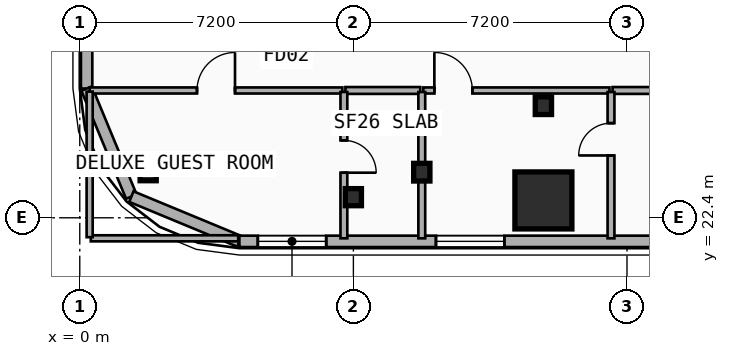
"""IFC4 building model, lengths in metres.
Left out: names, types, materials, properties, quantities, classifications, styles, units other than length and angle.
Written with IfcOpenShell. Run it as: python <this file> out.ifc"""

import sys

from ifc_helpers import new_model, si_unit, direction, frame, frame_2d, origin, origin_2d, place, context, subcontext, project, spatial, rectangle, i_section, extrude, element, fill, save


model = new_model("IFC4")
c1 = context("Model", 3, precision=1e-05, world=origin(), true_north=direction((0.0, 1.0)))
c2 = subcontext(c1, "Body", "Model", "MODEL_VIEW")
j1 = project(units=[si_unit("LENGTHUNIT", "METRE"), si_unit("PLANEANGLEUNIT", "RADIAN")], contexts=[c1])
p1 = place(None, origin())
s1 = spatial("IfcSite", under=j1, at=p1, CompositionType="ELEMENT")
p2 = place(p1, origin())
s2 = spatial("IfcBuilding", under=s1, at=p2, CompositionType="ELEMENT")
p3 = place(p2, frame((0.0, 0.0, 36.0)))
s3 = spatial("IfcBuildingStorey", under=s2, at=p3, CompositionType="ELEMENT", Elevation=36.0)
p4 = place(p3, frame((12.2, 25.35, 0.0), z_axis=(0.0, 0.0, 1.0), x_axis=(1.0, 0.0, 0.0)))
e1 = element("IfcColumn", 1, at=p4, inside=s3, PredefinedType="COLUMN", context=c2, shape_type="SweptSolid", body=[
    extrude(i_section(OverallWidth=0.428, OverallDepth=0.465, WebThickness=0.045, FlangeThickness=0.073, FilletRadius=0.015, at=origin_2d()), origin(), (0.0, 0.0, 1.0), 3.5),
])
p5 = place(p3, frame((12.2, 22.966, 0.0), z_axis=(0.0, -0.090310252801, 0.995913680114), x_axis=(1.0, 0.0, 0.0)))
e2 = element("IfcColumn", 2, at=p5, inside=s3, PredefinedType="COLUMN", context=c2, shape_type="SweptSolid", body=[
    extrude(rectangle(XDim=1.5, YDim=1.5, at=origin_2d()), origin(), (0.0, 0.0, 1.0), 3.514),
])
p6 = place(p3, frame((9.0, 23.6, 0.0), z_axis=(0.0, 0.0, 1.0), x_axis=(1.0, 0.0, 0.0)))
e3 = element("IfcColumn", 3, at=p6, inside=s3, PredefinedType="COLUMN", context=c2, shape_type="SweptSolid", body=[
    extrude(i_section(OverallWidth=0.428, OverallDepth=0.465, WebThickness=0.045, FlangeThickness=0.073, FilletRadius=0.015, at=origin_2d()), origin(), (0.0, 0.0, 1.0), 3.5),
])
p7 = place(p3, frame((1.8, 23.6, 0.0), z_axis=(0.0, 0.0, 1.0), x_axis=(1.0, 0.0, 0.0)))
e4 = element("IfcColumn", 4, at=p7, inside=s3, PredefinedType="COLUMN", context=c2, shape_type="SweptSolid", body=[
    extrude(i_section(OverallWidth=0.424, OverallDepth=0.45, WebThickness=0.041, FlangeThickness=0.065, FilletRadius=0.015, at=origin_2d()), origin(), (0.0, 0.0, 1.0), 3.5),
])
p8 = place(p3, frame((7.2, 23.039, 0.0), z_axis=(0.0, -0.079960777917, 0.996798010629), x_axis=(1.0, 0.0, 0.0)))
e5 = element("IfcColumn", 5, at=p8, inside=s3, PredefinedType="COLUMN", context=c2, shape_type="SweptSolid", body=[
    extrude(i_section(OverallWidth=0.424, OverallDepth=0.45, WebThickness=0.041, FlangeThickness=0.065, FilletRadius=0.015, at=origin_2d()), origin(), (0.0, 0.0, 1.0), 3.511),
])
p9 = place(p3, frame((0.18, 25.8, 0.0), z_axis=(0.0, 0.0, 1.0), x_axis=(0.0, 1.0, 0.0)))
e6 = element("IfcWall", 6, at=p9, inside=s3, PredefinedType="SOLIDWALL", context=c2, shape_type="SweptSolid", body=[
    extrude(rectangle(XDim=15.2, YDim=0.3, at=frame_2d((7.6, 0.0))), origin(), (0.0, 0.0, 1.0), 3.24),
])
p10 = place(p9, frame((2.67, 0.0, 0.48)))
e7 = element("IfcOpeningElement", 7, at=p10, cuts=e6, PredefinedType="OPENING", context=c2, shape_type="SweptSolid", body=[
    extrude(rectangle(XDim=1.4, YDim=1.8, at=frame_2d((0.7, 0.9))), frame((0.0, 0.16, 0.0), z_axis=(0.0, -1.0, 0.0), x_axis=(1.0, 0.0, 0.0)), (0.0, 0.0, 1.0), 0.32),
])
p11 = place(p9, frame((7.709, 0.0, 0.48)))
e8 = element("IfcOpeningElement", 8, at=p11, cuts=e6, PredefinedType="OPENING", context=c2, shape_type="SweptSolid", body=[
    extrude(rectangle(XDim=1.4, YDim=1.8, at=frame_2d((0.7, 0.9))), frame((0.0, 0.16, 0.0), z_axis=(0.0, -1.0, 0.0), x_axis=(1.0, 0.0, 0.0)), (0.0, 0.0, 1.0), 0.32),
])
for number, where, z_axis, x_axis in (
    (9, (1.357, 22.958, 0.0), (0.0, 0.0, 1.0), (-0.383, 0.924, 0.0)),
    (10, (4.2, 21.78, 0.0), (0.0, 0.0, 1.0), (-0.924, 0.383, 0.0)),
):
    element("IfcWall", number, at=place(p3, frame(where, z_axis=z_axis, x_axis=x_axis)), inside=s3, PredefinedType="SOLIDWALL", context=c2, shape_type="SweptSolid", body=[
        extrude(rectangle(XDim=3.077, YDim=0.3, at=frame_2d((1.538, 0.0))), origin(), (0.0, 0.0, 1.0), 3.24),
    ])
p12 = place(p3, frame((53.4, 21.78, 0.0), z_axis=(0.0, 0.0, 1.0), x_axis=(-1.0, 0.0, 0.0)))
e11 = element("IfcWall", 11, at=p12, inside=s3, PredefinedType="SOLIDWALL", context=c2, shape_type="SweptSolid", body=[
    extrude(rectangle(XDim=49.2, YDim=0.3, at=frame_2d((24.6, 0.0))), origin(), (0.0, 0.0, 1.0), 3.24),
])
p13 = place(p12, frame((46.915, 0.0, 0.65)))
e12 = element("IfcOpeningElement", 12, at=p13, cuts=e11, PredefinedType="OPENING", context=c2, shape_type="SweptSolid", body=[
    extrude(rectangle(XDim=1.8, YDim=1.8, at=frame_2d((0.9, 0.9))), frame((0.0, 0.16, 0.0), z_axis=(0.0, -1.0, 0.0), x_axis=(1.0, 0.0, 0.0)), (0.0, 0.0, 1.0), 0.32),
])
p14 = place(p12, frame((42.227, 0.0, 0.65)))
e13 = element("IfcOpeningElement", 13, at=p14, cuts=e11, PredefinedType="OPENING", context=c2, shape_type="SweptSolid", body=[
    extrude(rectangle(XDim=1.8, YDim=1.8, at=frame_2d((0.9, 0.9))), frame((0.0, 0.16, 0.0), z_axis=(0.0, -1.0, 0.0), x_axis=(1.0, 0.0, 0.0)), (0.0, 0.0, 1.0), 0.32),
])
p15 = place(p12, frame((33.055, 0.0, 0.48)))
e14 = element("IfcOpeningElement", 14, at=p15, cuts=e11, PredefinedType="OPENING", context=c2, shape_type="SweptSolid", body=[
    extrude(rectangle(XDim=1.2, YDim=1.5, at=frame_2d((0.6, 0.75))), frame((0.0, 0.16, 0.0), z_axis=(0.0, -1.0, 0.0), x_axis=(1.0, 0.0, 0.0)), (0.0, 0.0, 1.0), 0.32),
])
p16 = place(p12, frame((14.995, 0.0, 1.22)))
e15 = element("IfcOpeningElement", 15, at=p16, cuts=e11, PredefinedType="OPENING", context=c2, shape_type="SweptSolid", body=[
    extrude(rectangle(XDim=1.1, YDim=1.05, at=frame_2d((0.55, 0.525))), frame((0.0, 0.16, 0.0), z_axis=(0.0, -1.0, 0.0), x_axis=(1.0, 0.0, 0.0)), (0.0, 0.0, 1.0), 0.32),
])
p17 = place(p12, frame((5.173, 0.0, 0.65)))
e16 = element("IfcOpeningElement", 16, at=p17, cuts=e11, PredefinedType="OPENING", context=c2, shape_type="SweptSolid", body=[
    extrude(rectangle(XDim=1.8, YDim=1.8, at=frame_2d((0.9, 0.9))), frame((0.0, 0.16, 0.0), z_axis=(0.0, -1.0, 0.0), x_axis=(1.0, 0.0, 0.0)), (0.0, 0.0, 1.0), 0.32),
])
p18 = place(p12, frame((0.485, 0.0, 0.65)))
e17 = element("IfcOpeningElement", 17, at=p18, cuts=e11, PredefinedType="OPENING", context=c2, shape_type="SweptSolid", body=[
    extrude(rectangle(XDim=1.8, YDim=1.8, at=frame_2d((0.9, 0.9))), frame((0.0, 0.16, 0.0), z_axis=(0.0, -1.0, 0.0), x_axis=(1.0, 0.0, 0.0)), (0.0, 0.0, 1.0), 0.32),
])
p19 = place(p3, frame((0.26, 25.75, 0.0), z_axis=(0.0, 0.0, 1.0), x_axis=(1.0, 0.0, 0.0)))
e18 = element("IfcWall", 18, at=p19, inside=s3, PredefinedType="PARTITIONING", context=c2, shape_type="SweptSolid", body=[
    extrude(rectangle(XDim=6.65, YDim=0.16, at=frame_2d((3.325, 0.0))), origin(), (0.0, 0.0, 1.0), 2.57),
])
p20 = place(p19, frame((2.825, 0.0, 0.0)))
e19 = element("IfcOpeningElement", 19, at=p20, cuts=e18, PredefinedType="OPENING", context=c2, shape_type="SweptSolid", body=[
    extrude(rectangle(XDim=1.0, YDim=2.15, at=frame_2d((0.5, 1.075))), frame((0.0, 0.09, 0.0), z_axis=(0.0, -1.0, 0.0), x_axis=(1.0, 0.0, 0.0)), (0.0, 0.0, 1.0), 0.18),
])
p21 = place(p3, frame((6.99, 25.75, 0.0), z_axis=(0.0, 0.0, 1.0), x_axis=(1.0, 0.0, 0.0)))
e20 = element("IfcWall", 20, at=p21, inside=s3, PredefinedType="PLUMBINGWALL", context=c2, shape_type="SweptSolid", body=[
    extrude(rectangle(XDim=1.97, YDim=0.18, at=frame_2d((0.985, 0.0))), origin(), (0.0, 0.0, 1.0), 2.57),
])
p22 = place(p3, frame((9.04, 25.75, 0.0), z_axis=(0.0, 0.0, 1.0), x_axis=(1.0, 0.0, 0.0)))
e21 = element("IfcWall", 21, at=p22, inside=s3, PredefinedType="PARTITIONING", context=c2, shape_type="SweptSolid", body=[
    extrude(rectangle(XDim=4.899, YDim=0.16, at=frame_2d((2.449, 0.0))), origin(), (0.0, 0.0, 1.0), 2.28),
])
p23 = place(p22, frame((0.291, 0.0, 0.0)))
e22 = element("IfcOpeningElement", 22, at=p23, cuts=e21, PredefinedType="OPENING", context=c2, shape_type="SweptSolid", body=[
    extrude(rectangle(XDim=1.0, YDim=2.15, at=frame_2d((0.5, 1.075))), frame((0.0, 0.09, 0.0), z_axis=(0.0, -1.0, 0.0), x_axis=(1.0, 0.0, 0.0)), (0.0, 0.0, 1.0), 0.18),
])
p24 = place(p3, frame((14.019, 25.75, 0.0), z_axis=(0.0, 0.0, 1.0), x_axis=(1.0, 0.0, 0.0)))
e23 = element("IfcWall", 23, at=p24, inside=s3, PredefinedType="PLUMBINGWALL", context=c2, shape_type="SweptSolid", body=[
    extrude(rectangle(XDim=1.57, YDim=0.18, at=frame_2d((0.785, 0.0))), origin(), (0.0, 0.0, 1.0), 3.24),
])
p25 = place(p3, frame((6.95, 25.71, 0.0), z_axis=(0.0, 0.0, 1.0), x_axis=(0.0, -1.0, 0.0)))
e24 = element("IfcWall", 24, at=p25, inside=s3, PredefinedType="PLUMBINGWALL", context=c2, shape_type="SweptSolid", body=[
    extrude(rectangle(XDim=3.85, YDim=0.18, at=frame_2d((1.925, 0.0))), origin(), (0.0, 0.0, 1.0), 2.57),
])
p26 = place(p25, frame((1.273, 0.0, 0.0)))
e25 = element("IfcOpeningElement", 25, at=p26, cuts=e24, PredefinedType="OPENING", context=c2, shape_type="SweptSolid", body=[
    extrude(rectangle(XDim=0.85, YDim=2.1, at=frame_2d((0.425, 1.05))), frame((0.0, 0.1, 0.0), z_axis=(0.0, -1.0, 0.0), x_axis=(1.0, 0.0, 0.0)), (0.0, 0.0, 1.0), 0.2),
])
p27 = place(p3, frame((9.0, 21.86, 0.0), z_axis=(0.0, 0.0, 1.0), x_axis=(0.0, 1.0, 0.0)))
e26 = element("IfcWall", 26, at=p27, inside=s3, PredefinedType="PLUMBINGWALL", context=c2, shape_type="SweptSolid", body=[
    extrude(rectangle(XDim=3.85, YDim=0.18, at=frame_2d((1.925, 0.0))), origin(), (0.0, 0.0, 1.0), 2.72),
])
p28 = place(p3, frame((13.979, 21.86, 0.0), z_axis=(0.0, 0.0, 1.0), x_axis=(0.0, 1.0, 0.0)))
e27 = element("IfcWall", 27, at=p28, inside=s3, PredefinedType="PLUMBINGWALL", context=c2, shape_type="SweptSolid", body=[
    extrude(rectangle(XDim=3.85, YDim=0.18, at=frame_2d((1.925, 0.0))), origin(), (0.0, 0.0, 1.0), 2.82),
])
p29 = place(p28, frame((2.18, 0.0, 0.0)))
e28 = element("IfcOpeningElement", 28, at=p29, cuts=e27, PredefinedType="OPENING", context=c2, shape_type="SweptSolid", body=[
    extrude(rectangle(XDim=0.85, YDim=2.1, at=frame_2d((0.425, 1.05))), frame((0.0, 0.1, 0.0), z_axis=(0.0, -1.0, 0.0), x_axis=(1.0, 0.0, 0.0)), (0.0, 0.0, 1.0), 0.2),
])
p30 = place(p3, frame((0.29, 21.86, 0.0), z_axis=(0.0, 0.0, 1.0), x_axis=(1.0, 0.0, 0.0)))
e29 = element("IfcWall", 29, at=p30, inside=s3, PredefinedType="PARTITIONING", context=c2, shape_type="SweptSolid", body=[
    extrude(rectangle(XDim=3.88, YDim=0.16, at=frame_2d((1.94, 0.0))), origin(), (0.0, 0.0, 1.0), 3.24),
])
p31 = place(p3, frame((0.26, 21.89, 0.0), z_axis=(0.0, 0.0, 1.0), x_axis=(0.0, 1.0, 0.0)))
e30 = element("IfcWall", 30, at=p31, inside=s3, PredefinedType="PARTITIONING", context=c2, shape_type="SweptSolid", body=[
    extrude(rectangle(XDim=3.83, YDim=0.16, at=frame_2d((1.915, 0.0))), origin(), (0.0, 0.0, 1.0), 3.24),
])
p32 = place(p13, origin())
e31 = element("IfcWindow", 31, at=p32, inside=s3, PartitioningType="SINGLE_PANEL", PredefinedType="WINDOW", context=c2, shape_type="SweptSolid", body=[
    extrude(rectangle(XDim=1.8, YDim=1.8, at=frame_2d((0.9, 0.9))), frame((0.0, 0.03, 0.0), z_axis=(0.0, -1.0, 0.0), x_axis=(1.0, 0.0, 0.0)), (0.0, 0.0, 1.0), 0.06),
])
fill(e12, e31)
p33 = place(p14, origin())
e32 = element("IfcWindow", 32, at=p33, inside=s3, PartitioningType="SINGLE_PANEL", PredefinedType="WINDOW", context=c2, shape_type="SweptSolid", body=[
    extrude(rectangle(XDim=1.8, YDim=1.8, at=frame_2d((0.9, 0.9))), frame((0.0, 0.03, 0.0), z_axis=(0.0, -1.0, 0.0), x_axis=(1.0, 0.0, 0.0)), (0.0, 0.0, 1.0), 0.06),
])
fill(e13, e32)
p34 = place(p20, origin())
e33 = element("IfcDoor", 33, at=p34, inside=s3, OperationType="SINGLE_SWING_RIGHT", PredefinedType="DOOR", context=c2, shape_type="SweptSolid", body=[
    extrude(rectangle(XDim=1.0, YDim=2.15, at=frame_2d((0.5, 1.075))), frame((0.0, 0.025, 0.0), z_axis=(0.0, -1.0, 0.0), x_axis=(1.0, 0.0, 0.0)), (0.0, 0.0, 1.0), 0.05),
])
fill(e19, e33)
p35 = place(p23, origin())
e34 = element("IfcDoor", 34, at=p35, inside=s3, OperationType="SINGLE_SWING_LEFT", PredefinedType="DOOR", context=c2, shape_type="SweptSolid", body=[
    extrude(rectangle(XDim=1.0, YDim=2.15, at=frame_2d((0.5, 1.075))), frame((0.0, 0.025, 0.0), z_axis=(0.0, -1.0, 0.0), x_axis=(1.0, 0.0, 0.0)), (0.0, 0.0, 1.0), 0.05),
])
fill(e22, e34)
p36 = place(p26, origin())
e35 = element("IfcDoor", 35, at=p36, inside=s3, OperationType="SINGLE_SWING_RIGHT", PredefinedType="DOOR", context=c2, shape_type="SweptSolid", body=[
    extrude(rectangle(XDim=0.85, YDim=2.1, at=frame_2d((0.425, 1.05))), frame((0.0, 0.025, 0.0), z_axis=(0.0, -1.0, 0.0), x_axis=(1.0, 0.0, 0.0)), (0.0, 0.0, 1.0), 0.05),
])
fill(e25, e35)
p37 = place(p29, origin())
e36 = element("IfcDoor", 36, at=p37, inside=s3, OperationType="SINGLE_SWING_LEFT", PredefinedType="DOOR", context=c2, shape_type="SweptSolid", body=[
    extrude(rectangle(XDim=0.85, YDim=2.1, at=frame_2d((0.425, 1.05))), frame((0.0, 0.025, 0.0), z_axis=(0.0, -1.0, 0.0), x_axis=(1.0, 0.0, 0.0)), (0.0, 0.0, 1.0), 0.05),
])
fill(e28, e36)
save(model, sys.argv[1])
